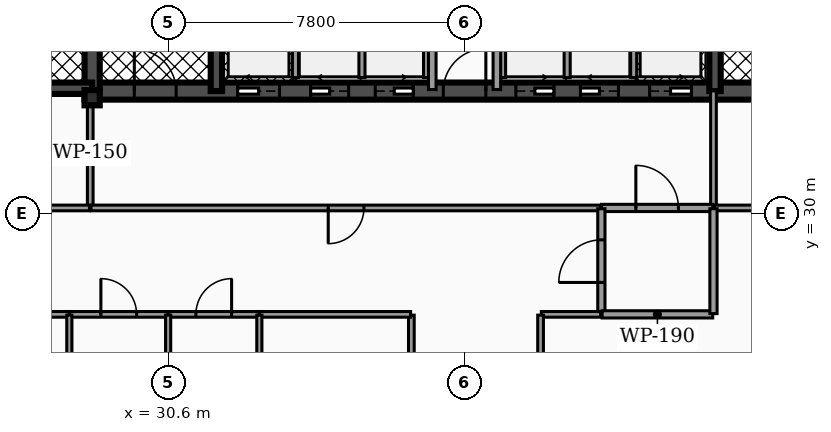
"""IFC4 building model, lengths in metres.
Left out: names, types, materials, properties, quantities, classifications, styles, units other than length and angle.
Written with IfcOpenShell. Run it as: python <this file> out.ifc"""

import sys

from ifc_helpers import new_model, si_unit, direction, frame, frame_2d, origin, origin_2d, place, context, subcontext, project, spatial, rectangle, hollow_rectangle, extrude, element, fill, save


model = new_model("IFC4")
c1 = context("Model", 3, precision=1e-05, world=origin(), true_north=direction((0.0, 1.0)))
c2 = subcontext(c1, "Body", "Model", "MODEL_VIEW")
j1 = project(units=[si_unit("LENGTHUNIT", "METRE"), si_unit("PLANEANGLEUNIT", "RADIAN")], contexts=[c1])
p1 = place(None, origin())
s1 = spatial("IfcSite", under=j1, at=p1, CompositionType="ELEMENT")
p2 = place(p1, origin())
s2 = spatial("IfcBuilding", under=s1, at=p2, CompositionType="ELEMENT")
p3 = place(p2, origin())
s3 = spatial("IfcBuildingStorey", under=s2, at=p3, CompositionType="ELEMENT", Elevation=0.0)
p4 = place(p3, frame((28.4, 33.225, 0.0), z_axis=(0.0, 0.0, 1.0), x_axis=(1.0, 0.0, 0.0)))
e1 = element("IfcWall", 1, at=p4, inside=s3, PredefinedType="SHEAR", context=c2, shape_type="SweptSolid", body=[
    extrude(rectangle(XDim=20.11, YDim=0.45, at=frame_2d((10.055, 0.0))), origin(), (0.0, 0.0, 1.0), 4.82),
])
p5 = place(p4, frame((4.03, 0.0, 0.0)))
e2 = element("IfcOpeningElement", 2, at=p5, cuts=e1, PredefinedType="OPENING", context=c2, shape_type="SweptSolid", body=[
    extrude(rectangle(XDim=1.1, YDim=2.15, at=frame_2d((0.55, 1.075))), frame((0.0, 0.235, 0.0), z_axis=(0.0, -1.0, 0.0), x_axis=(1.0, 0.0, 0.0)), (0.0, 0.0, 1.0), 0.47),
])
p6 = place(p4, frame((14.87, 0.0, 0.0)))
e3 = element("IfcOpeningElement", 3, at=p6, cuts=e1, PredefinedType="OPENING", context=c2, shape_type="SweptSolid", body=[
    extrude(rectangle(XDim=1.1, YDim=2.15, at=frame_2d((0.55, 1.075))), frame((0.0, 0.235, 0.0), z_axis=(0.0, -1.0, 0.0), x_axis=(1.0, 0.0, 0.0)), (0.0, 0.0, 1.0), 0.47),
])
p7 = place(p4, frame((5.95, 0.0, 0.0)))
e4 = element("IfcOpeningElement", 4, at=p7, cuts=e1, PredefinedType="OPENING", context=c2, shape_type="SweptSolid", body=[
    extrude(rectangle(XDim=1.0, YDim=2.1, at=frame_2d((0.5, 1.05))), frame((0.0, 0.235, 0.0), z_axis=(0.0, -1.0, 0.0), x_axis=(1.0, 0.0, 0.0)), (0.0, 0.0, 1.0), 0.47),
])
p8 = place(p4, frame((7.65, 0.0, 0.0)))
e5 = element("IfcOpeningElement", 5, at=p8, cuts=e1, PredefinedType="OPENING", context=c2, shape_type="SweptSolid", body=[
    extrude(rectangle(XDim=1.0, YDim=2.1, at=frame_2d((0.5, 1.05))), frame((0.0, 0.235, 0.0), z_axis=(0.0, -1.0, 0.0), x_axis=(1.0, 0.0, 0.0)), (0.0, 0.0, 1.0), 0.47),
])
p9 = place(p4, frame((11.35, 0.0, 0.0)))
e6 = element("IfcOpeningElement", 6, at=p9, cuts=e1, PredefinedType="OPENING", context=c2, shape_type="SweptSolid", body=[
    extrude(rectangle(XDim=1.0, YDim=2.1, at=frame_2d((0.5, 1.05))), frame((0.0, 0.235, 0.0), z_axis=(0.0, -1.0, 0.0), x_axis=(1.0, 0.0, 0.0)), (0.0, 0.0, 1.0), 0.47),
])
p10 = place(p4, frame((13.05, 0.0, 0.0)))
e7 = element("IfcOpeningElement", 7, at=p10, cuts=e1, PredefinedType="OPENING", context=c2, shape_type="SweptSolid", body=[
    extrude(rectangle(XDim=1.0, YDim=2.1, at=frame_2d((0.5, 1.05))), frame((0.0, 0.235, 0.0), z_axis=(0.0, -1.0, 0.0), x_axis=(1.0, 0.0, 0.0)), (0.0, 0.0, 1.0), 0.47),
])
p11 = place(p4, frame((1.31, 0.0, 0.0)))
e8 = element("IfcOpeningElement", 8, at=p11, cuts=e1, PredefinedType="OPENING", context=c2, shape_type="SweptSolid", body=[
    extrude(rectangle(XDim=1.1, YDim=2.2, at=frame_2d((0.55, 1.1))), frame((0.0, 0.235, 0.0), z_axis=(0.0, -1.0, 0.0), x_axis=(1.0, 0.0, 0.0)), (0.0, 0.0, 1.0), 0.47),
])
p12 = place(p4, frame((9.44, 0.0, 0.0)))
e9 = element("IfcOpeningElement", 9, at=p12, cuts=e1, PredefinedType="OPENING", context=c2, shape_type="SweptSolid", body=[
    extrude(rectangle(XDim=1.12, YDim=2.05, at=frame_2d((0.56, 1.025))), frame((0.0, 0.235, 0.0), z_axis=(0.0, -1.0, 0.0), x_axis=(1.0, 0.0, 0.0)), (0.0, 0.0, 1.0), 0.47),
])
p13 = place(p4, frame((17.65, 0.0, 0.0)))
e10 = element("IfcOpeningElement", 10, at=p13, cuts=e1, PredefinedType="OPENING", context=c2, shape_type="SweptSolid", body=[
    extrude(rectangle(XDim=1.1, YDim=2.2, at=frame_2d((0.55, 1.1))), frame((0.0, 0.235, 0.0), z_axis=(0.0, -1.0, 0.0), x_axis=(1.0, 0.0, 0.0)), (0.0, 0.0, 1.0), 0.47),
])
p14 = place(p3, frame((28.6, 33.225, 0.0), z_axis=(0.0, 0.0, 1.0), x_axis=(0.0, 1.0, 0.0)))
e11 = element("IfcWall", 11, at=p14, inside=s3, PredefinedType="SHEAR", context=c2, shape_type="SweptSolid", body=[
    extrude(rectangle(XDim=10.25, YDim=0.4, at=frame_2d((5.125, 0.0))), origin(), (0.0, 0.0, 1.0), 4.82),
])
for number, where, z_axis, x_axis in (
    (12, (31.87, 33.225, 0.0), (0.0, 0.0, 1.0), (0.0, 1.0, 0.0)),
    (13, (44.99, 33.225, 0.0), (0.0, 0.0, 1.0), (0.0, 1.0, 0.0)),
):
    element("IfcWall", number, at=place(p3, frame(where, z_axis=z_axis, x_axis=x_axis)), inside=s3, PredefinedType="SHEAR", context=c2, shape_type="SweptSolid", body=[
        extrude(rectangle(XDim=10.25, YDim=0.3, at=frame_2d((5.125, 0.0))), origin(), (0.0, 0.0, 1.0), 4.82),
    ])
p15 = place(p3, frame((25.08, 33.3, 0.0), z_axis=(0.0, 0.0, 1.0), x_axis=(1.0, 0.0, 0.0)))
e14 = element("IfcWall", 14, at=p15, inside=s3, PredefinedType="SHEAR", context=c2, shape_type="SweptSolid", body=[
    extrude(rectangle(XDim=3.52, YDim=0.3, at=frame_2d((1.76, 0.0))), origin(), (0.0, 0.0, 1.0), 4.82),
])
p16 = place(p15, frame((1.335, 0.0, 0.0)))
e15 = element("IfcOpeningElement", 15, at=p16, cuts=e14, PredefinedType="OPENING", context=c2, shape_type="SweptSolid", body=[
    extrude(rectangle(XDim=0.95, YDim=2.2, at=frame_2d((0.475, 1.1))), frame((0.0, 0.16, 0.0), z_axis=(0.0, -1.0, 0.0), x_axis=(1.0, 0.0, 0.0)), (0.0, 0.0, 1.0), 0.32),
])
p17 = place(p3, frame((28.6, 33.05, 0.0), z_axis=(0.0, 0.0, 1.0), x_axis=(1.0, 0.0, 0.0)))
e16 = element("IfcColumn", 16, at=p17, inside=s3, PredefinedType="PILASTER", context=c2, shape_type="SweptSolid", body=[
    extrude(hollow_rectangle(XDim=0.4, YDim=0.4, WallThickness=0.02, at=origin_2d()), origin(), (0.0, 0.0, 1.0), 4.82),
])
for number, where, z_axis, x_axis in (
    (17, (33.95, 33.58, 0.0), (0.0, 0.0, 1.0), (0.0, 1.0, 0.0)),
    (18, (42.85, 33.58, 0.0), (0.0, 0.0, 1.0), (0.0, 1.0, 0.0)),
):
    element("IfcWall", number, at=place(p3, frame(where, z_axis=z_axis, x_axis=x_axis)), inside=s3, PredefinedType="SOLIDWALL", context=c2, shape_type="SweptSolid", body=[
        extrude(rectangle(XDim=2.45, YDim=0.16, at=frame_2d((1.225, 0.0))), origin(), (0.0, 0.0, 1.0), 3.792),
    ])
for number, where, z_axis, x_axis in (
    (19, (35.7, 33.58, 0.0), (0.0, 0.0, 1.0), (0.0, 1.0, 0.0)),
    (20, (37.4, 33.58, 0.0), (0.0, 0.0, 1.0), (0.0, 1.0, 0.0)),
    (21, (39.4, 33.58, 0.0), (0.0, 0.0, 1.0), (0.0, 1.0, 0.0)),
    (22, (41.1, 33.58, 0.0), (0.0, 0.0, 1.0), (0.0, 1.0, 0.0)),
):
    element("IfcWall", number, at=place(p3, frame(where, z_axis=z_axis, x_axis=x_axis)), inside=s3, PredefinedType="SOLIDWALL", context=c2, shape_type="SweptSolid", body=[
        extrude(rectangle(XDim=2.25, YDim=0.16, at=frame_2d((1.125, 0.0))), origin(), (0.0, 0.0, 1.0), 3.792),
    ])
p18 = place(p3, frame((37.55, 33.265, 0.0), z_axis=(0.0, 0.0, 1.0), x_axis=(0.0, 1.0, 0.0)))
e23 = element("IfcWall", 23, at=p18, inside=s3, PredefinedType="PARTITIONING", context=c2, shape_type="SweptSolid", body=[
    extrude(rectangle(XDim=4.265, YDim=0.2, at=frame_2d((2.133, 0.0))), origin(), (0.0, 0.0, 1.0), 3.777),
])
p19 = place(p18, frame((3.093, 0.0, 0.0)))
e24 = element("IfcOpeningElement", 24, at=p19, cuts=e23, PredefinedType="OPENING", context=c2, shape_type="SweptSolid", body=[
    extrude(rectangle(XDim=0.88, YDim=2.05, at=frame_2d((0.44, 1.025))), frame((0.0, 0.11, 0.0), z_axis=(0.0, -1.0, 0.0), x_axis=(1.0, 0.0, 0.0)), (0.0, 0.0, 1.0), 0.22),
])
p20 = place(p3, frame((39.25, 37.53, 0.0), z_axis=(0.0, 0.0, 1.0), x_axis=(0.0, -1.0, 0.0)))
e25 = element("IfcWall", 25, at=p20, inside=s3, PredefinedType="PARTITIONING", context=c2, shape_type="SweptSolid", body=[
    extrude(rectangle(XDim=4.265, YDim=0.2, at=frame_2d((2.133, 0.0))), origin(), (0.0, 0.0, 1.0), 3.777),
])
p21 = place(p20, frame((0.292, 0.0, 0.0)))
e26 = element("IfcOpeningElement", 26, at=p21, cuts=e25, PredefinedType="OPENING", context=c2, shape_type="SweptSolid", body=[
    extrude(rectangle(XDim=0.88, YDim=2.05, at=frame_2d((0.44, 1.025))), frame((0.0, 0.11, 0.0), z_axis=(0.0, -1.0, 0.0), x_axis=(1.0, 0.0, 0.0)), (0.0, 0.0, 1.0), 0.22),
])
p22 = place(p3, frame((28.55, 30.17, 0.0), z_axis=(0.0, 0.0, 1.0), x_axis=(0.0, 1.0, 0.0)))
e27 = element("IfcWall", 27, at=p22, inside=s3, PredefinedType="PARTITIONING", context=c2, shape_type="SweptSolid", body=[
    extrude(rectangle(XDim=2.862, YDim=0.15, at=frame_2d((1.431, 0.0))), origin(), (0.0, 0.0, 1.0), 3.777),
])
p23 = place(p3, frame((44.95, 30.17, 0.0), z_axis=(0.0, 0.0, 1.0), x_axis=(0.0, 1.0, 0.0)))
e28 = element("IfcWall", 28, at=p23, inside=s3, PredefinedType="PARTITIONING", context=c2, shape_type="SweptSolid", body=[
    extrude(rectangle(XDim=3.06, YDim=0.15, at=frame_2d((1.53, 0.0))), origin(), (0.0, 0.0, 1.0), 3.777),
])
p24 = place(p3, frame((42.005, 30.15, 0.0), z_axis=(0.0, 0.0, 1.0), x_axis=(1.0, 0.0, 0.0)))
e29 = element("IfcWall", 29, at=p24, inside=s3, PredefinedType="PARTITIONING", context=c2, shape_type="SweptSolid", body=[
    extrude(rectangle(XDim=2.925, YDim=0.19, at=frame_2d((1.462, 0.0))), origin(), (0.0, 0.0, 1.0), 3.777),
])
p25 = place(p24, frame((0.903, 0.0, 0.0)))
e30 = element("IfcOpeningElement", 30, at=p25, cuts=e29, PredefinedType="OPENING", context=c2, shape_type="SweptSolid", body=[
    extrude(rectangle(XDim=1.12, YDim=2.05, at=frame_2d((0.56, 1.025))), frame((0.0, 0.105, 0.0), z_axis=(0.0, -1.0, 0.0), x_axis=(1.0, 0.0, 0.0)), (0.0, 0.0, 1.0), 0.21),
])
p26 = place(p3, frame((41.995, 30.15, 0.0), z_axis=(0.0, 0.0, 1.0), x_axis=(-1.0, 0.0, 0.0)))
e31 = element("IfcWall", 31, at=p26, inside=s3, PredefinedType="PARTITIONING", context=c2, shape_type="SweptSolid", body=[
    extrude(rectangle(XDim=13.425, YDim=0.15, at=frame_2d((6.712, 0.0))), origin(), (0.0, 0.0, 1.0), 3.777),
])
p27 = place(p26, frame((6.242, 0.0, 0.0)))
e32 = element("IfcOpeningElement", 32, at=p27, cuts=e31, PredefinedType="OPENING", context=c2, shape_type="SweptSolid", body=[
    extrude(rectangle(XDim=0.94, YDim=2.05, at=frame_2d((0.47, 1.025))), frame((0.0, 0.085, 0.0), z_axis=(0.0, -1.0, 0.0), x_axis=(1.0, 0.0, 0.0)), (0.0, 0.0, 1.0), 0.17),
])
p28 = place(p3, frame((25.22, 30.15, 0.0), z_axis=(0.0, 0.0, 1.0), x_axis=(1.0, 0.0, 0.0)))
e33 = element("IfcWall", 33, at=p28, inside=s3, PredefinedType="PARTITIONING", context=c2, shape_type="SweptSolid", body=[
    extrude(rectangle(XDim=3.31, YDim=0.15, at=frame_2d((1.655, 0.0))), origin(), (0.0, 0.0, 1.0), 3.777),
])
p29 = place(p3, frame((44.97, 30.15, 0.0), z_axis=(0.0, 0.0, 1.0), x_axis=(1.0, 0.0, 0.0)))
e34 = element("IfcWall", 34, at=p29, inside=s3, PredefinedType="PARTITIONING", context=c2, shape_type="SweptSolid", body=[
    extrude(rectangle(XDim=4.81, YDim=0.15, at=frame_2d((2.405, 0.0))), origin(), (0.0, 0.0, 1.0), 3.777),
])
p30 = place(p3, frame((42.0, 27.37, 0.0), z_axis=(0.0, 0.0, 1.0), x_axis=(0.0, 1.0, 0.0)))
e35 = element("IfcWall", 35, at=p30, inside=s3, PredefinedType="PARTITIONING", context=c2, shape_type="SweptSolid", body=[
    extrude(rectangle(XDim=2.76, YDim=0.19, at=frame_2d((1.38, 0.0))), origin(), (0.0, 0.0, 1.0), 3.777),
])
p31 = place(p30, frame((0.82, 0.0, 0.0)))
e36 = element("IfcOpeningElement", 36, at=p31, cuts=e35, PredefinedType="OPENING", context=c2, shape_type="SweptSolid", body=[
    extrude(rectangle(XDim=1.12, YDim=2.05, at=frame_2d((0.56, 1.025))), frame((0.0, 0.105, 0.0), z_axis=(0.0, -1.0, 0.0), x_axis=(1.0, 0.0, 0.0)), (0.0, 0.0, 1.0), 0.21),
])
p32 = place(p3, frame((42.02, 27.35, 0.0), z_axis=(0.0, 0.0, 1.0), x_axis=(1.0, 0.0, 0.0)))
e37 = element("IfcWall", 37, at=p32, inside=s3, PredefinedType="PARTITIONING", context=c2, shape_type="SweptSolid", body=[
    extrude(rectangle(XDim=2.91, YDim=0.19, at=frame_2d((1.455, 0.0))), origin(), (0.0, 0.0, 1.0), 3.777),
])
p33 = place(p3, frame((44.95, 27.37, 0.0), z_axis=(0.0, 0.0, 1.0), x_axis=(0.0, 1.0, 0.0)))
e38 = element("IfcWall", 38, at=p33, inside=s3, PredefinedType="PARTITIONING", context=c2, shape_type="SweptSolid", body=[
    extrude(rectangle(XDim=2.76, YDim=0.19, at=frame_2d((1.38, 0.0))), origin(), (0.0, 0.0, 1.0), 3.777),
])
p34 = place(p3, frame((25.605, 27.35, 0.0), z_axis=(0.0, 0.0, 1.0), x_axis=(1.0, 0.0, 0.0)))
e39 = element("IfcWall", 39, at=p34, inside=s3, PredefinedType="PARTITIONING", context=c2, shape_type="SweptSolid", body=[
    extrude(rectangle(XDim=2.39, YDim=0.15, at=frame_2d((1.195, 0.0))), origin(), (0.0, 0.0, 1.0), 3.777),
])
p35 = place(p34, frame((0.725, 0.0, 0.0)))
e40 = element("IfcOpeningElement", 40, at=p35, cuts=e39, PredefinedType="OPENING", context=c2, shape_type="SweptSolid", body=[
    extrude(rectangle(XDim=0.94, YDim=2.05, at=frame_2d((0.47, 1.025))), frame((0.0, 0.085, 0.0), z_axis=(0.0, -1.0, 0.0), x_axis=(1.0, 0.0, 0.0)), (0.0, 0.0, 1.0), 0.17),
])
p36 = place(p3, frame((28.005, 27.35, 0.0), z_axis=(0.0, 0.0, 1.0), x_axis=(1.0, 0.0, 0.0)))
e41 = element("IfcWall", 41, at=p36, inside=s3, PredefinedType="PARTITIONING", context=c2, shape_type="SweptSolid", body=[
    extrude(rectangle(XDim=2.59, YDim=0.15, at=frame_2d((1.295, 0.0))), origin(), (0.0, 0.0, 1.0), 3.777),
])
p37 = place(p36, frame((0.825, 0.0, 0.0)))
e42 = element("IfcOpeningElement", 42, at=p37, cuts=e41, PredefinedType="OPENING", context=c2, shape_type="SweptSolid", body=[
    extrude(rectangle(XDim=0.94, YDim=2.05, at=frame_2d((0.47, 1.025))), frame((0.0, 0.085, 0.0), z_axis=(0.0, -1.0, 0.0), x_axis=(1.0, 0.0, 0.0)), (0.0, 0.0, 1.0), 0.17),
])
p38 = place(p3, frame((30.605, 27.35, 0.0), z_axis=(0.0, 0.0, 1.0), x_axis=(1.0, 0.0, 0.0)))
e43 = element("IfcWall", 43, at=p38, inside=s3, PredefinedType="PARTITIONING", context=c2, shape_type="SweptSolid", body=[
    extrude(rectangle(XDim=2.39, YDim=0.15, at=frame_2d((1.195, 0.0))), origin(), (0.0, 0.0, 1.0), 3.777),
])
p39 = place(p38, frame((0.725, 0.0, 0.0)))
e44 = element("IfcOpeningElement", 44, at=p39, cuts=e43, PredefinedType="OPENING", context=c2, shape_type="SweptSolid", body=[
    extrude(rectangle(XDim=0.94, YDim=2.05, at=frame_2d((0.47, 1.025))), frame((0.0, 0.085, 0.0), z_axis=(0.0, -1.0, 0.0), x_axis=(1.0, 0.0, 0.0)), (0.0, 0.0, 1.0), 0.17),
])
p40 = place(p3, frame((40.42, 27.35, 0.0), z_axis=(0.0, 0.0, 1.0), x_axis=(1.0, 0.0, 0.0)))
e45 = element("IfcWall", 45, at=p40, inside=s3, PredefinedType="PARTITIONING", context=c2, shape_type="SweptSolid", body=[
    extrude(rectangle(XDim=1.56, YDim=0.15, at=frame_2d((0.78, 0.0))), origin(), (0.0, 0.0, 1.0), 3.777),
])
p41 = place(p3, frame((40.4, 23.205, 0.0), z_axis=(0.0, 0.0, 1.0), x_axis=(0.0, 1.0, 0.0)))
e46 = element("IfcWall", 46, at=p41, inside=s3, PredefinedType="PARTITIONING", context=c2, shape_type="SweptSolid", body=[
    extrude(rectangle(XDim=4.125, YDim=0.15, at=frame_2d((2.062, 0.0))), origin(), (0.0, 0.0, 1.0), 3.777),
])
p42 = place(p3, frame((37.0, 14.32, 0.0), z_axis=(0.0, 0.0, 1.0), x_axis=(0.0, 1.0, 0.0)))
e47 = element("IfcWall", 47, at=p42, inside=s3, PredefinedType="PARTITIONING", context=c2, shape_type="SweptSolid", body=[
    extrude(rectangle(XDim=13.01, YDim=0.15, at=frame_2d((6.505, 0.0))), origin(), (0.0, 0.0, 1.0), 3.777),
])
p43 = place(p42, frame((6.035, 0.0, 0.0)))
e48 = element("IfcOpeningElement", 48, at=p43, cuts=e47, PredefinedType="OPENING", context=c2, shape_type="SweptSolid", body=[
    extrude(rectangle(XDim=0.94, YDim=2.05, at=frame_2d((0.47, 1.025))), frame((0.0, 0.085, 0.0), z_axis=(0.0, -1.0, 0.0), x_axis=(1.0, 0.0, 0.0)), (0.0, 0.0, 1.0), 0.17),
])
p44 = place(p3, frame((33.005, 27.35, 0.0), z_axis=(0.0, 0.0, 1.0), x_axis=(1.0, 0.0, 0.0)))
e49 = element("IfcWall", 49, at=p44, inside=s3, PredefinedType="PARTITIONING", context=c2, shape_type="SweptSolid", body=[
    extrude(rectangle(XDim=3.975, YDim=0.15, at=frame_2d((1.988, 0.0))), origin(), (0.0, 0.0, 1.0), 3.777),
])
for number, where, z_axis, x_axis in (
    (50, (28.0, 23.82, 0.0), (0.0, 0.0, 1.0), (0.0, 1.0, 0.0)),
    (51, (30.6, 23.82, 0.0), (0.0, 0.0, 1.0), (0.0, 1.0, 0.0)),
    (52, (33.0, 23.82, 0.0), (0.0, 0.0, 1.0), (0.0, 1.0, 0.0)),
):
    element("IfcWall", number, at=place(p3, frame(where, z_axis=z_axis, x_axis=x_axis)), inside=s3, PredefinedType="PARTITIONING", context=c2, shape_type="SweptSolid", body=[
        extrude(rectangle(XDim=3.51, YDim=0.135, at=frame_2d((1.755, 0.0))), origin(), (0.0, 0.0, 1.0), 3.777),
    ])
p45 = place(p5, origin())
e53 = element("IfcDoor", 53, at=p45, inside=s3, OperationType="SLIDING_TO_LEFT", PredefinedType="DOOR", context=c2, shape_type="SweptSolid", body=[
    extrude(rectangle(XDim=1.1, YDim=2.15, at=frame_2d((0.55, 1.075))), frame((0.0, 0.025, 0.0), z_axis=(0.0, -1.0, 0.0), x_axis=(1.0, 0.0, 0.0)), (0.0, 0.0, 1.0), 0.05),
])
fill(e2, e53)
p46 = place(p6, origin())
e54 = element("IfcDoor", 54, at=p46, inside=s3, OperationType="SLIDING_TO_RIGHT", PredefinedType="DOOR", context=c2, shape_type="SweptSolid", body=[
    extrude(rectangle(XDim=1.1, YDim=2.15, at=frame_2d((0.55, 1.075))), frame((0.0, 0.025, 0.0), z_axis=(0.0, -1.0, 0.0), x_axis=(1.0, 0.0, 0.0)), (0.0, 0.0, 1.0), 0.05),
])
fill(e3, e54)
p47 = place(p7, origin())
e55 = element("IfcDoor", 55, at=p47, inside=s3, OperationType="SLIDING_TO_LEFT", PredefinedType="DOOR", context=c2, shape_type="SweptSolid", body=[
    extrude(rectangle(XDim=1.0, YDim=2.1, at=frame_2d((0.5, 1.05))), frame((0.0, 0.025, 0.0), z_axis=(0.0, -1.0, 0.0), x_axis=(1.0, 0.0, 0.0)), (0.0, 0.0, 1.0), 0.05),
])
fill(e4, e55)
p48 = place(p8, origin())
e56 = element("IfcDoor", 56, at=p48, inside=s3, OperationType="SLIDING_TO_RIGHT", PredefinedType="DOOR", context=c2, shape_type="SweptSolid", body=[
    extrude(rectangle(XDim=1.0, YDim=2.1, at=frame_2d((0.5, 1.05))), frame((0.0, 0.025, 0.0), z_axis=(0.0, -1.0, 0.0), x_axis=(1.0, 0.0, 0.0)), (0.0, 0.0, 1.0), 0.05),
])
fill(e5, e56)
p49 = place(p9, origin())
e57 = element("IfcDoor", 57, at=p49, inside=s3, OperationType="SLIDING_TO_RIGHT", PredefinedType="DOOR", context=c2, shape_type="SweptSolid", body=[
    extrude(rectangle(XDim=1.0, YDim=2.1, at=frame_2d((0.5, 1.05))), frame((0.0, 0.025, 0.0), z_axis=(0.0, -1.0, 0.0), x_axis=(1.0, 0.0, 0.0)), (0.0, 0.0, 1.0), 0.05),
])
fill(e6, e57)
p50 = place(p10, origin())
e58 = element("IfcDoor", 58, at=p50, inside=s3, OperationType="SLIDING_TO_LEFT", PredefinedType="DOOR", context=c2, shape_type="SweptSolid", body=[
    extrude(rectangle(XDim=1.0, YDim=2.1, at=frame_2d((0.5, 1.05))), frame((0.0, 0.025, 0.0), z_axis=(0.0, -1.0, 0.0), x_axis=(1.0, 0.0, 0.0)), (0.0, 0.0, 1.0), 0.05),
])
fill(e7, e58)
p51 = place(p11, origin())
e59 = element("IfcDoor", 59, at=p51, inside=s3, OperationType="SINGLE_SWING_LEFT", PredefinedType="DOOR", context=c2, shape_type="SweptSolid", body=[
    extrude(rectangle(XDim=1.1, YDim=2.2, at=frame_2d((0.55, 1.1))), frame((0.0, 0.025, 0.0), z_axis=(0.0, -1.0, 0.0), x_axis=(1.0, 0.0, 0.0)), (0.0, 0.0, 1.0), 0.05),
])
fill(e8, e59)
p52 = place(p12, origin())
e60 = element("IfcDoor", 60, at=p52, inside=s3, OperationType="SINGLE_SWING_RIGHT", PredefinedType="DOOR", context=c2, shape_type="SweptSolid", body=[
    extrude(rectangle(XDim=1.12, YDim=2.05, at=frame_2d((0.56, 1.025))), frame((0.0, 0.025, 0.0), z_axis=(0.0, -1.0, 0.0), x_axis=(1.0, 0.0, 0.0)), (0.0, 0.0, 1.0), 0.05),
])
fill(e9, e60)
p53 = place(p25, origin())
e61 = element("IfcDoor", 61, at=p53, inside=s3, OperationType="SINGLE_SWING_LEFT", PredefinedType="DOOR", context=c2, shape_type="SweptSolid", body=[
    extrude(rectangle(XDim=1.12, YDim=2.05, at=frame_2d((0.56, 1.025))), frame((0.0, 0.025, 0.0), z_axis=(0.0, -1.0, 0.0), x_axis=(1.0, 0.0, 0.0)), (0.0, 0.0, 1.0), 0.05),
])
fill(e30, e61)
p54 = place(p27, origin())
e62 = element("IfcDoor", 62, at=p54, inside=s3, OperationType="SINGLE_SWING_RIGHT", PredefinedType="DOOR", context=c2, shape_type="SweptSolid", body=[
    extrude(rectangle(XDim=0.94, YDim=2.05, at=frame_2d((0.47, 1.025))), frame((0.0, 0.025, 0.0), z_axis=(0.0, -1.0, 0.0), x_axis=(1.0, 0.0, 0.0)), (0.0, 0.0, 1.0), 0.05),
])
fill(e32, e62)
p55 = place(p31, origin())
e63 = element("IfcDoor", 63, at=p55, inside=s3, OperationType="SINGLE_SWING_LEFT", PredefinedType="DOOR", context=c2, shape_type="SweptSolid", body=[
    extrude(rectangle(XDim=1.12, YDim=2.05, at=frame_2d((0.56, 1.025))), frame((0.0, 0.025, 0.0), z_axis=(0.0, -1.0, 0.0), x_axis=(1.0, 0.0, 0.0)), (0.0, 0.0, 1.0), 0.05),
])
fill(e36, e63)
p56 = place(p37, origin())
e64 = element("IfcDoor", 64, at=p56, inside=s3, OperationType="SINGLE_SWING_LEFT", PredefinedType="DOOR", context=c2, shape_type="SweptSolid", body=[
    extrude(rectangle(XDim=0.94, YDim=2.05, at=frame_2d((0.47, 1.025))), frame((0.0, 0.025, 0.0), z_axis=(0.0, -1.0, 0.0), x_axis=(1.0, 0.0, 0.0)), (0.0, 0.0, 1.0), 0.05),
])
fill(e42, e64)
p57 = place(p39, origin())
e65 = element("IfcDoor", 65, at=p57, inside=s3, OperationType="SINGLE_SWING_RIGHT", PredefinedType="DOOR", context=c2, shape_type="SweptSolid", body=[
    extrude(rectangle(XDim=0.94, YDim=2.05, at=frame_2d((0.47, 1.025))), frame((0.0, 0.025, 0.0), z_axis=(0.0, -1.0, 0.0), x_axis=(1.0, 0.0, 0.0)), (0.0, 0.0, 1.0), 0.05),
])
fill(e44, e65)
save(model, sys.argv[1])
